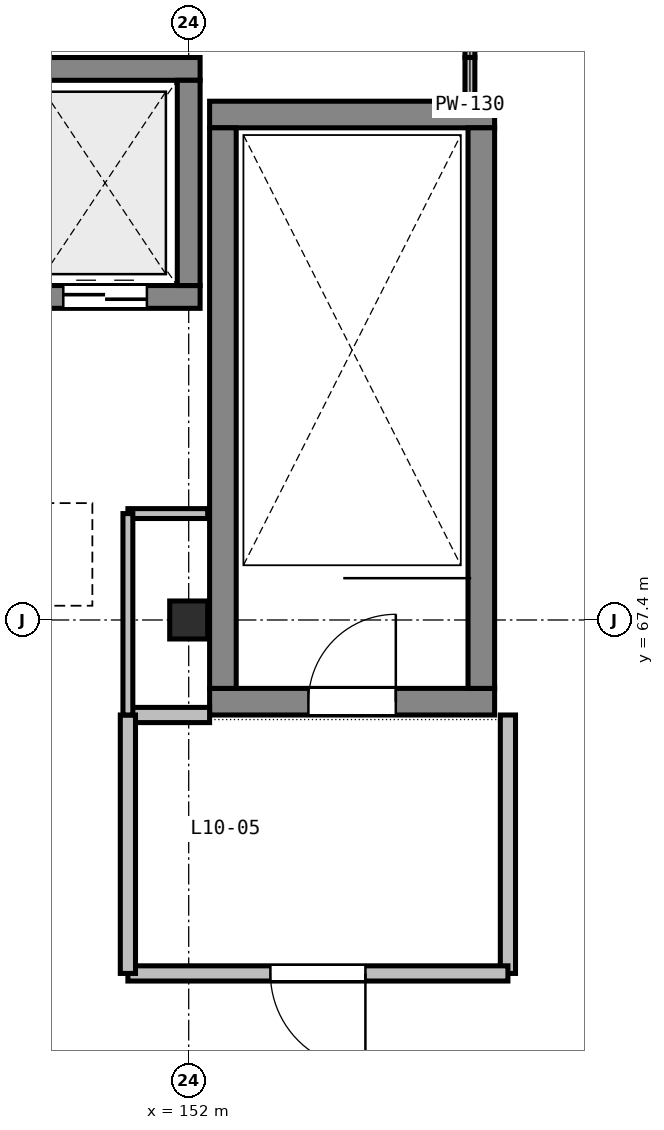
"""IFC4 building model, lengths in metres.
Left out: names, types, materials, properties, quantities, classifications, styles, units other than length and angle.
Written with IfcOpenShell. Run it as: python <this file> out.ifc"""

import sys

from ifc_helpers import new_model, si_unit, direction, frame, frame_2d, origin, origin_2d, place, context, subcontext, project, spatial, rectangle, extrude, element, fill, save


model = new_model("IFC4")
c1 = context("Model", 3, precision=1e-05, world=origin(), true_north=direction((0.0, 1.0)))
c2 = subcontext(c1, "Body", "Model", "MODEL_VIEW")
j1 = project(units=[si_unit("LENGTHUNIT", "METRE"), si_unit("PLANEANGLEUNIT", "RADIAN")], contexts=[c1])
p1 = place(None, origin())
s1 = spatial("IfcSite", under=j1, at=p1, CompositionType="ELEMENT")
p2 = place(p1, origin())
s2 = spatial("IfcBuilding", under=s1, at=p2, CompositionType="ELEMENT")
p3 = place(p2, frame((0.0, 0.0, 44.4)))
s3 = spatial("IfcBuildingStorey", under=s2, at=p3, CompositionType="ELEMENT", Elevation=44.4)
p4 = place(p3, frame((152.0, 67.4, 0.0), z_axis=(0.0, 0.0, 1.0), x_axis=(1.0, 0.0, 0.0)))
e1 = element("IfcColumn", 1, at=p4, inside=s3, PredefinedType="COLUMN", context=c2, shape_type="SweptSolid", body=[
    extrude(rectangle(XDim=0.5, YDim=0.5, at=origin_2d()), origin(), (0.0, 0.0, 1.0), 3.72),
])
p5 = place(p3, frame((152.275, 66.325, 0.0), z_axis=(0.0, 0.0, 1.0), x_axis=(1.0, 0.0, 0.0)))
e2 = element("IfcWall", 2, at=p5, inside=s3, PredefinedType="SHEAR", context=c2, shape_type="SweptSolid", body=[
    extrude(rectangle(XDim=3.75, YDim=0.35, at=frame_2d((1.875, 0.0))), origin(), (0.0, 0.0, 1.0), 3.55),
])
p6 = place(p5, frame((1.3, 0.0, 0.0)))
e3 = element("IfcOpeningElement", 3, at=p6, cuts=e2, PredefinedType="OPENING", context=c2, shape_type="SweptSolid", body=[
    extrude(rectangle(XDim=1.15, YDim=2.15, at=frame_2d((0.575, 1.075))), frame((0.0, 0.185, 0.0), z_axis=(0.0, -1.0, 0.0), x_axis=(1.0, 0.0, 0.0)), (0.0, 0.0, 1.0), 0.37),
])
p7 = place(p3, frame((152.275, 74.05, 0.0), z_axis=(0.0, 0.0, 1.0), x_axis=(1.0, 0.0, 0.0)))
e4 = element("IfcWall", 4, at=p7, inside=s3, PredefinedType="SHEAR", context=c2, shape_type="SweptSolid", body=[
    extrude(rectangle(XDim=3.75, YDim=0.35, at=frame_2d((1.875, 0.0))), origin(), (0.0, 0.0, 1.0), 3.55),
])
for number, where, z_axis, x_axis in (
    (5, (152.45, 66.5, 0.0), (0.0, 0.0, 1.0), (0.0, 1.0, 0.0)),
    (6, (155.85, 66.5, 0.0), (0.0, 0.0, 1.0), (0.0, 1.0, 0.0)),
):
    element("IfcWall", number, at=place(p3, frame(where, z_axis=z_axis, x_axis=x_axis)), inside=s3, PredefinedType="SHEAR", context=c2, shape_type="SweptSolid", body=[
        extrude(rectangle(XDim=7.375, YDim=0.35, at=frame_2d((3.688, 0.0))), origin(), (0.0, 0.0, 1.0), 3.55),
    ])
p8 = place(p3, frame((149.65, 71.65, 0.0), z_axis=(0.0, 0.0, 1.0), x_axis=(1.0, 0.0, 0.0)))
e7 = element("IfcWall", 7, at=p8, inside=s3, PredefinedType="SHEAR", context=c2, shape_type="SweptSolid", body=[
    extrude(rectangle(XDim=2.5, YDim=0.3, at=frame_2d((1.25, 0.0))), origin(), (0.0, 0.0, 1.0), 3.55),
])
p9 = place(p8, frame((0.7, 0.0, 0.0)))
e8 = element("IfcOpeningElement", 8, at=p9, cuts=e7, PredefinedType="OPENING", context=c2, shape_type="SweptSolid", body=[
    extrude(rectangle(XDim=1.1, YDim=2.1, at=frame_2d((0.55, 1.05))), frame((0.0, 0.16, 0.0), z_axis=(0.0, -1.0, 0.0), x_axis=(1.0, 0.0, 0.0)), (0.0, 0.0, 1.0), 0.32),
])
p10 = place(p3, frame((149.65, 74.65, 0.0), z_axis=(0.0, 0.0, 1.0), x_axis=(1.0, 0.0, 0.0)))
e9 = element("IfcWall", 9, at=p10, inside=s3, PredefinedType="SHEAR", context=c2, shape_type="SweptSolid", body=[
    extrude(rectangle(XDim=2.5, YDim=0.3, at=frame_2d((1.25, 0.0))), origin(), (0.0, 0.0, 1.0), 3.55),
])
p11 = place(p3, frame((152.0, 71.8, 0.0), z_axis=(0.0, 0.0, 1.0), x_axis=(0.0, 1.0, 0.0)))
e10 = element("IfcWall", 10, at=p11, inside=s3, PredefinedType="SHEAR", context=c2, shape_type="SweptSolid", body=[
    extrude(rectangle(XDim=2.7, YDim=0.3, at=frame_2d((1.35, 0.0))), origin(), (0.0, 0.0, 1.0), 3.55),
])
p12 = place(p3, frame((151.2, 66.15, 0.0), z_axis=(0.0, 0.0, 1.0), x_axis=(1.0, 0.0, 0.0)))
e11 = element("IfcWall", 11, at=p12, inside=s3, PredefinedType="PARTITIONING", context=c2, shape_type="SweptSolid", body=[
    extrude(rectangle(XDim=1.075, YDim=0.2, at=frame_2d((0.538, 0.0))), origin(), (0.0, 0.0, 1.0), 3.36),
])
p13 = place(p3, frame((156.2, 66.15, 0.0), z_axis=(0.0, 0.0, 1.0), x_axis=(0.0, -1.0, 0.0)))
e12 = element("IfcWall", 12, at=p13, inside=s3, PredefinedType="PARTITIONING", context=c2, shape_type="SweptSolid", body=[
    extrude(rectangle(XDim=3.4, YDim=0.2, at=frame_2d((1.7, 0.0))), origin(), (0.0, 0.0, 1.0), 3.36),
])
p14 = place(p3, frame((156.2, 62.75, 0.0), z_axis=(0.0, 0.0, 1.0), x_axis=(-1.0, 0.0, 0.0)))
e13 = element("IfcWall", 13, at=p14, inside=s3, PredefinedType="PARTITIONING", context=c2, shape_type="SweptSolid", body=[
    extrude(rectangle(XDim=5.0, YDim=0.2, at=frame_2d((2.5, 0.0))), origin(), (0.0, 0.0, 1.0), 3.36),
])
p15 = place(p14, frame((1.875, 0.0, 0.0)))
e14 = element("IfcOpeningElement", 14, at=p15, cuts=e13, PredefinedType="OPENING", context=c2, shape_type="SweptSolid", body=[
    extrude(rectangle(XDim=1.25, YDim=2.15, at=frame_2d((0.625, 1.075))), frame((0.0, 0.11, 0.0), z_axis=(0.0, -1.0, 0.0), x_axis=(1.0, 0.0, 0.0)), (0.0, 0.0, 1.0), 0.22),
])
p16 = place(p3, frame((151.2, 62.75, 0.0), z_axis=(0.0, 0.0, 1.0), x_axis=(0.0, 1.0, 0.0)))
e15 = element("IfcWall", 15, at=p16, inside=s3, PredefinedType="PARTITIONING", context=c2, shape_type="SweptSolid", body=[
    extrude(rectangle(XDim=3.4, YDim=0.2, at=frame_2d((1.7, 0.0))), origin(), (0.0, 0.0, 1.0), 3.36),
])
p17 = place(p3, frame((151.2, 68.8, 0.0), z_axis=(0.0, 0.0, 1.0), x_axis=(1.0, 0.0, 0.0)))
e16 = element("IfcWall", 16, at=p17, inside=s3, PredefinedType="PARTITIONING", context=c2, shape_type="SweptSolid", body=[
    extrude(rectangle(XDim=1.05, YDim=0.13, at=frame_2d((0.525, 0.0))), origin(), (0.0, 0.0, 1.0), 2.635),
])
p18 = place(p3, frame((155.7, 78.2, 0.0), z_axis=(0.0, 0.0, 1.0), x_axis=(0.0, -1.0, 0.0)))
e17 = element("IfcWall", 17, at=p18, inside=s3, PredefinedType="PARTITIONING", context=c2, shape_type="SweptSolid", body=[
    extrude(rectangle(XDim=3.4, YDim=0.13, at=frame_2d((1.7, 0.0))), origin(), (0.0, 0.0, 1.0), 2.885),
])
p19 = place(p18, frame((1.2, 0.0, 0.0)))
e18 = element("IfcOpeningElement", 18, at=p19, cuts=e17, PredefinedType="OPENING", context=c2, shape_type="SweptSolid", body=[
    extrude(rectangle(XDim=1.0, YDim=2.06, at=frame_2d((0.5, 1.03))), frame((0.0, 0.075, 0.0), z_axis=(0.0, -1.0, 0.0), x_axis=(1.0, 0.0, 0.0)), (0.0, 0.0, 1.0), 0.15),
])
p20 = place(p3, frame((155.7, 74.8, 0.0), z_axis=(0.0, 0.0, 1.0), x_axis=(0.0, -1.0, 0.0)))
e19 = element("IfcWall", 19, at=p20, inside=s3, PredefinedType="PARTITIONING", context=c2, shape_type="SweptSolid", body=[
    extrude(rectangle(XDim=0.573, YDim=0.13, at=frame_2d((0.287, 0.0))), origin(), (0.0, 0.0, 1.0), 3.36),
])
p21 = place(p3, frame((151.2, 66.15, 0.0), z_axis=(0.0, 0.0, 1.0), x_axis=(0.0, 1.0, 0.0)))
e20 = element("IfcWall", 20, at=p21, inside=s3, PredefinedType="PARTITIONING", context=c2, shape_type="SweptSolid", body=[
    extrude(rectangle(XDim=2.65, YDim=0.13, at=frame_2d((1.325, 0.0))), origin(), (0.0, 0.0, 1.0), 3.36),
])
p22 = place(p6, origin())
e21 = element("IfcDoor", 21, at=p22, inside=s3, OperationType="SINGLE_SWING_RIGHT", PredefinedType="DOOR", context=c2, shape_type="SweptSolid", body=[
    extrude(rectangle(XDim=1.15, YDim=2.15, at=frame_2d((0.575, 1.075))), frame((0.0, 0.025, 0.0), z_axis=(0.0, -1.0, 0.0), x_axis=(1.0, 0.0, 0.0)), (0.0, 0.0, 1.0), 0.05),
])
fill(e3, e21)
p23 = place(p9, origin())
e22 = element("IfcDoor", 22, at=p23, inside=s3, OperationType="DOUBLE_DOOR_SLIDING", PredefinedType="DOOR", context=c2, shape_type="SweptSolid", body=[
    extrude(rectangle(XDim=1.1, YDim=2.1, at=frame_2d((0.55, 1.05))), frame((0.0, 0.025, 0.0), z_axis=(0.0, -1.0, 0.0), x_axis=(1.0, 0.0, 0.0)), (0.0, 0.0, 1.0), 0.05),
])
fill(e8, e22)
p24 = place(p15, origin())
e23 = element("IfcDoor", 23, at=p24, inside=s3, OperationType="SINGLE_SWING_LEFT", PredefinedType="DOOR", context=c2, shape_type="SweptSolid", body=[
    extrude(rectangle(XDim=1.25, YDim=2.15, at=frame_2d((0.625, 1.075))), frame((0.0, 0.025, 0.0), z_axis=(0.0, -1.0, 0.0), x_axis=(1.0, 0.0, 0.0)), (0.0, 0.0, 1.0), 0.05),
])
fill(e14, e23)
save(model, sys.argv[1])
